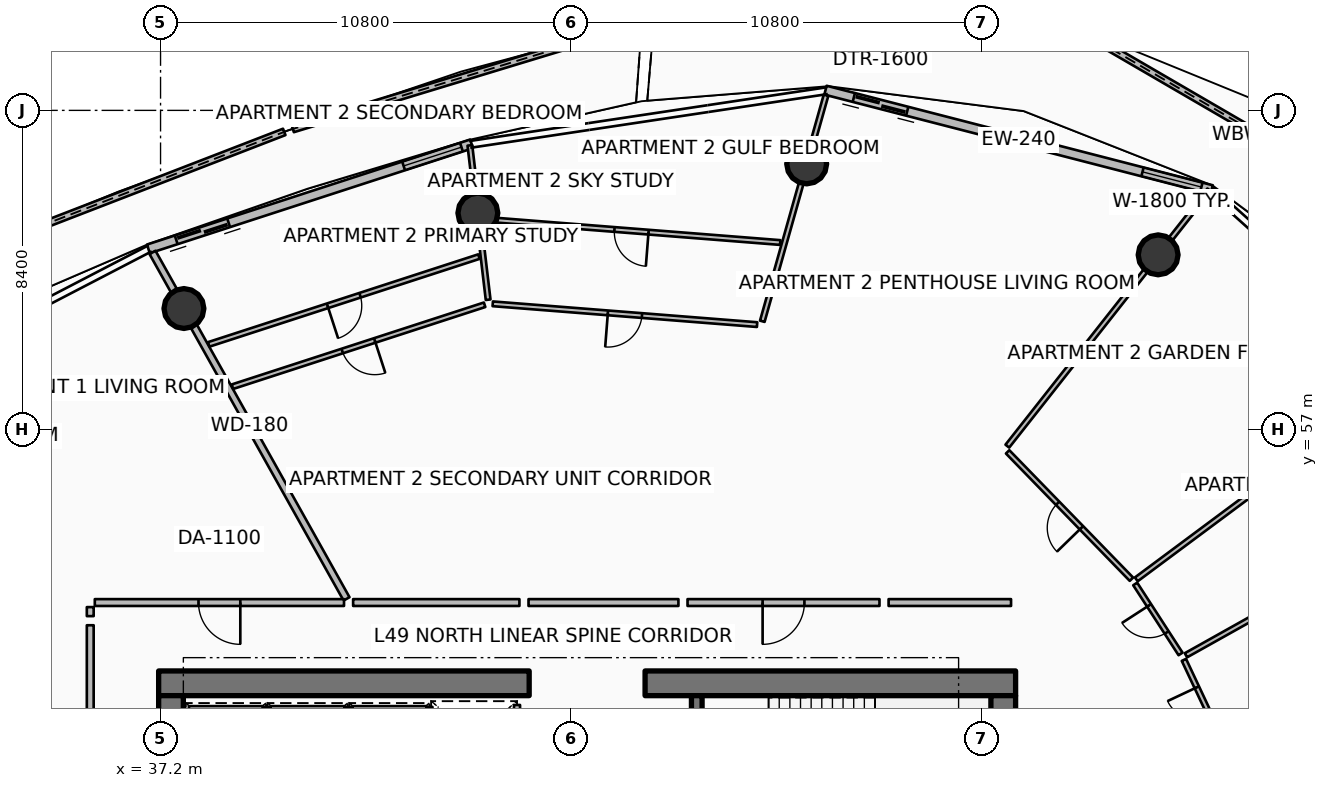
"""IFC4 building model, lengths in metres.
Left out: names, types, materials, properties, quantities, classifications, styles, units other than length and angle.
Written with IfcOpenShell. Run it as: python <this file> out.ifc"""

import sys

from ifc_helpers import new_model, si_unit, direction, frame, frame_2d, origin, origin_2d, place, context, subcontext, project, spatial, polyline, rectangle, circle, outline, extrude, element, fill, save


model = new_model("IFC4")
c1 = context("Model", 3, precision=1e-05, world=origin(), true_north=direction((0.0, 1.0)))
c2 = subcontext(c1, "Body", "Model", "MODEL_VIEW")
j1 = project(units=[si_unit("LENGTHUNIT", "METRE"), si_unit("PLANEANGLEUNIT", "RADIAN")], contexts=[c1])
p1 = place(None, origin())
s1 = spatial("IfcSite", under=j1, at=p1, CompositionType="ELEMENT")
p2 = place(p1, origin())
s2 = spatial("IfcBuilding", under=s1, at=p2, CompositionType="ELEMENT")
p3 = place(p2, frame((0.0, 0.0, 195.3)))
s3 = spatial("IfcBuildingStorey", under=s2, at=p3, CompositionType="ELEMENT", Elevation=195.3)
for number, where, z_axis, x_axis in (
    (1, (37.15, 50.325, 0.0), (0.0, 0.0, 1.0), (1.0, 0.0, 0.0)),
    (2, (49.95, 50.325, 0.0), (0.0, 0.0, 1.0), (1.0, 0.0, 0.0)),
):
    element("IfcWall", number, at=place(p3, frame(where, z_axis=z_axis, x_axis=x_axis)), inside=s3, PredefinedType="SHEAR", context=c2, shape_type="SweptSolid", body=[
        extrude(rectangle(XDim=9.75, YDim=0.65, at=frame_2d((4.875, 0.0))), origin(), (0.0, 0.0, 1.0), 3.75),
    ])
for number, where, z_axis, x_axis in (
    (3, (37.475, 34.0, 0.0), (0.0, 0.0, 1.0), (0.0, 1.0, 0.0)),
    (4, (59.375, 34.0, 0.0), (0.0, 0.0, 1.0), (0.0, 1.0, 0.0)),
):
    element("IfcWall", number, at=place(p3, frame(where, z_axis=z_axis, x_axis=x_axis)), inside=s3, PredefinedType="SHEAR", context=c2, shape_type="SweptSolid", body=[
        extrude(rectangle(XDim=16.0, YDim=0.65, at=frame_2d((8.0, 0.0))), origin(), (0.0, 0.0, 1.0), 3.75),
    ])
p4 = place(p3, frame((51.31, 46.5, 0.0), z_axis=(0.0, 0.0, 1.0), x_axis=(0.0, 1.0, 0.0)))
e5 = element("IfcWall", 5, at=p4, inside=s3, PredefinedType="SHEAR", context=c2, shape_type="SweptSolid", body=[
    extrude(rectangle(XDim=3.5, YDim=0.28, at=frame_2d((1.75, 0.0))), origin(), (0.0, 0.0, 1.0), 3.75),
])
for number, where, z_axis, x_axis in (
    (6, (63.451, 61.599, 0.0), (0.0, 0.0, 1.0), (1.0, 0.0, 0.0)),
    (7, (54.202, 63.992, 0.0), (0.0, 0.0, 1.0), (1.0, 0.0, 0.0)),
    (8, (45.55, 62.7, 0.0), (0.0, 0.0, 1.0), (1.0, 0.0, 0.0)),
    (9, (37.815, 60.186, 0.0), (0.0, 0.0, 1.0), (1.0, 0.0, 0.0)),
):
    element("IfcColumn", number, at=place(p3, frame(where, z_axis=z_axis, x_axis=x_axis)), inside=s3, PredefinedType="COLUMN", context=c2, shape_type="SweptSolid", body=[
        extrude(circle(Radius=0.525, at=origin_2d()), origin(), (0.0, 0.0, 1.0), 3.5),
    ])
p5 = place(p3, frame((71.016, 61.902, 0.0), z_axis=(0.0, 0.0, 1.0), x_axis=(-0.864391947404, 0.502818616663, 0.0)))
e10 = element("IfcWall", 10, at=p5, inside=s3, PredefinedType="PARAPET", context=c2, shape_type="SweptSolid", body=[
    extrude(outline(polyline([(0.0, 0.0), (11.37, 0.0), (11.37, 1.832), (5.685, 1.853), (0.0, 1.756), (0.0, 0.0)])), frame((0.0, 0.09, 0.0), z_axis=(0.0, -1.0, 0.0), x_axis=(1.0, 0.0, 0.0)), (0.0, 0.0, 1.0), 0.18),
])
p6 = place(p3, frame((49.865, 67.702, 0.0), z_axis=(0.0, 0.0, 1.0), x_axis=(-0.956822857871, -0.290671668135, 0.0)))
e11 = element("IfcWall", 11, at=p6, inside=s3, PredefinedType="PARAPET", context=c2, shape_type="SweptSolid", body=[
    extrude(outline(polyline([(0.0, 0.0), (9.598, 0.0), (9.598, 1.148), (4.799, 1.284), (0.0, 1.483), (0.0, 0.0)])), frame((0.0, 0.09, 0.0), z_axis=(0.0, -1.0, 0.0), x_axis=(1.0, 0.0, 0.0)), (0.0, 0.0, 1.0), 0.18),
])
p7 = place(p3, frame((40.455, 64.834, 0.0), z_axis=(0.0, 0.0, 1.0), x_axis=(-0.932733135956, -0.360567465378, 0.0)))
e12 = element("IfcWall", 12, at=p7, inside=s3, PredefinedType="PARAPET", context=c2, shape_type="SweptSolid", body=[
    extrude(outline(polyline([(0.0, 0.0), (9.473, 0.0), (9.473, 1.224), (4.736, 1.127), (0.0, 1.148), (0.0, 0.0)])), frame((0.0, 0.09, 0.0), z_axis=(0.0, -1.0, 0.0), x_axis=(1.0, 0.0, 0.0)), (0.0, 0.0, 1.0), 0.18),
])
p8 = place(p3, frame((64.86, 63.313, 0.0), z_axis=(0.0, 0.0, 1.0), x_axis=(-0.968374028006, 0.249502989727, 0.0)))
e13 = element("IfcWall", 13, at=p8, inside=s3, PredefinedType="SOLIDWALL", context=c2, shape_type="SweptSolid", body=[
    extrude(rectangle(XDim=10.494, YDim=0.24, at=frame_2d((5.247, 0.0))), origin(), (0.0, 0.0, 1.0), 2.45),
])
p9 = place(p8, frame((8.274, 0.0, 0.0)))
e14 = element("IfcOpeningElement", 14, at=p9, cuts=e13, PredefinedType="OPENING", context=c2, shape_type="SweptSolid", body=[
    extrude(rectangle(XDim=1.45, YDim=2.15, at=frame_2d((0.725, 1.075))), frame((0.0, 0.13, 0.0), z_axis=(0.0, -1.0, 0.0), x_axis=(1.0, 0.0, 0.0)), (0.0, 0.0, 1.0), 0.26),
])
p10 = place(p8, frame((0.28, 0.0, 0.65)))
e15 = element("IfcOpeningElement", 15, at=p10, cuts=e13, PredefinedType="OPENING", context=c2, shape_type="SweptSolid", body=[
    extrude(rectangle(XDim=1.6, YDim=1.5, at=frame_2d((0.8, 0.75))), frame((0.0, 0.13, 0.0), z_axis=(0.0, -1.0, 0.0), x_axis=(1.0, 0.0, 0.0)), (0.0, 0.0, 1.0), 0.26),
])
p11 = place(p3, frame((45.384, 64.519, 0.0), z_axis=(0.0, 0.0, 1.0), x_axis=(-0.951058543936, -0.309010753869, 0.0)))
e16 = element("IfcWall", 16, at=p11, inside=s3, PredefinedType="SOLIDWALL", context=c2, shape_type="SweptSolid", body=[
    extrude(rectangle(XDim=8.942, YDim=0.24, at=frame_2d((4.471, 0.0))), origin(), (0.0, 0.0, 1.0), 2.45),
])
p12 = place(p11, frame((6.722, 0.0, 0.0)))
e17 = element("IfcOpeningElement", 17, at=p12, cuts=e16, PredefinedType="OPENING", context=c2, shape_type="SweptSolid", body=[
    extrude(rectangle(XDim=1.45, YDim=2.15, at=frame_2d((0.725, 1.075))), frame((0.0, 0.13, 0.0), z_axis=(0.0, -1.0, 0.0), x_axis=(1.0, 0.0, 0.0)), (0.0, 0.0, 1.0), 0.26),
])
p13 = place(p11, frame((0.28, 0.0, 0.65)))
e18 = element("IfcOpeningElement", 18, at=p13, cuts=e16, PredefinedType="OPENING", context=c2, shape_type="SweptSolid", body=[
    extrude(rectangle(XDim=1.6, YDim=1.5, at=frame_2d((0.8, 0.75))), frame((0.0, 0.13, 0.0), z_axis=(0.0, -1.0, 0.0), x_axis=(1.0, 0.0, 0.0)), (0.0, 0.0, 1.0), 0.26),
])
for number, where, z_axis, x_axis in (
    (19, (39.975, 48.095, 0.0), (0.0, 0.0, 1.0), (0.0, 1.0, 0.0)),
    (20, (42.125, 48.095, 0.0), (0.0, 0.0, 1.0), (0.0, 1.0, 0.0)),
    (21, (44.275, 48.095, 0.0), (0.0, 0.0, 1.0), (0.0, 1.0, 0.0)),
):
    element("IfcWall", number, at=place(p3, frame(where, z_axis=z_axis, x_axis=x_axis)), inside=s3, PredefinedType="PARTITIONING", context=c2, shape_type="SweptSolid", body=[
        extrude(rectangle(XDim=1.61, YDim=0.16, at=frame_2d((0.805, 0.0))), origin(), (0.0, 0.0, 1.0), 3.5),
    ])
p14 = place(p3, frame((46.58, 48.045, 0.0), z_axis=(0.0, 0.0, 1.0), x_axis=(0.0, 1.0, 0.0)))
e22 = element("IfcWall", 22, at=p14, inside=s3, PredefinedType="PARTITIONING", context=c2, shape_type="SweptSolid", body=[
    extrude(rectangle(XDim=1.71, YDim=0.16, at=frame_2d((0.855, 0.0))), origin(), (0.0, 0.0, 1.0), 3.5),
])
p15 = place(p3, frame((42.094, 52.546, 0.0), z_axis=(0.0, 0.0, 1.0), x_axis=(-0.488614041717, 0.872500039104, 0.0)))
e23 = element("IfcWall", 23, at=p15, inside=s3, PredefinedType="PARTITIONING", context=c2, shape_type="SweptSolid", body=[
    extrude(rectangle(XDim=10.448, YDim=0.18, at=frame_2d((5.224, 0.0))), origin(), (0.0, 0.0, 1.0), 2.94),
])
p16 = place(p3, frame((42.028, 52.45, 0.0), z_axis=(0.0, 0.0, 1.0), x_axis=(-1.0, 0.0, 0.0)))
e24 = element("IfcWall", 24, at=p16, inside=s3, PredefinedType="PARTITIONING", context=c2, shape_type="SweptSolid", body=[
    extrude(rectangle(XDim=6.558, YDim=0.18, at=frame_2d((3.279, 0.0))), origin(), (0.0, 0.0, 1.0), 2.94),
])
p17 = place(p16, frame((2.729, 0.0, 0.0)))
e25 = element("IfcOpeningElement", 25, at=p17, cuts=e24, PredefinedType="OPENING", context=c2, shape_type="SweptSolid", body=[
    extrude(rectangle(XDim=1.1, YDim=2.1, at=frame_2d((0.55, 1.05))), frame((0.0, 0.1, 0.0), z_axis=(0.0, -1.0, 0.0), x_axis=(1.0, 0.0, 0.0)), (0.0, 0.0, 1.0), 0.2),
])
p18 = place(p3, frame((35.35, 52.33, 0.0), z_axis=(0.0, 0.0, 1.0), x_axis=(0.0, -1.0, 0.0)))
e26 = element("IfcWall", 26, at=p18, inside=s3, PredefinedType="PARTITIONING", context=c2, shape_type="SweptSolid", body=[
    extrude(rectangle(XDim=0.238, YDim=0.18, at=frame_2d((0.119, 0.0))), origin(), (0.0, 0.0, 1.0), 2.94),
])
p19 = place(p3, frame((35.35, 51.853, 0.0), z_axis=(0.0, 0.0, 1.0), x_axis=(0.0, -1.0, 0.0)))
e27 = element("IfcWall", 27, at=p19, inside=s3, PredefinedType="PARTITIONING", context=c2, shape_type="SweptSolid", body=[
    extrude(rectangle(XDim=6.165, YDim=0.18, at=frame_2d((3.083, 0.0))), origin(), (0.0, 0.0, 1.0), 2.94),
])
p20 = place(p3, frame((56.118, 52.45, 0.0), z_axis=(0.0, 0.0, 1.0), x_axis=(-1.0, 0.0, 0.0)))
e28 = element("IfcWall", 28, at=p20, inside=s3, PredefinedType="PARTITIONING", context=c2, shape_type="SweptSolid", body=[
    extrude(rectangle(XDim=5.051, YDim=0.18, at=frame_2d((2.525, 0.0))), origin(), (0.0, 0.0, 1.0), 2.94),
])
p21 = place(p20, frame((1.975, 0.0, 0.0)))
e29 = element("IfcOpeningElement", 29, at=p21, cuts=e28, PredefinedType="OPENING", context=c2, shape_type="SweptSolid", body=[
    extrude(rectangle(XDim=1.1, YDim=2.1, at=frame_2d((0.55, 1.05))), frame((0.0, 0.1, 0.0), z_axis=(0.0, -1.0, 0.0), x_axis=(1.0, 0.0, 0.0)), (0.0, 0.0, 1.0), 0.2),
])
p22 = place(p3, frame((65.288, 48.688, 0.0), z_axis=(0.0, 0.0, 1.0), x_axis=(0.932645255022, 0.360794717652, 0.0)))
e30 = element("IfcWall", 30, at=p22, inside=s3, PredefinedType="PARTITIONING", context=c2, shape_type="SweptSolid", body=[
    extrude(rectangle(XDim=8.863, YDim=0.125, at=frame_2d((4.432, 0.0))), origin(), (0.0, 0.0, 1.0), 2.94),
])
p23 = place(p3, frame((65.17, 48.728, 0.0), z_axis=(0.0, 0.0, 1.0), x_axis=(-0.42584510915, 0.904796078138, 0.0)))
e31 = element("IfcWall", 31, at=p23, inside=s3, PredefinedType="PARTITIONING", context=c2, shape_type="SweptSolid", body=[
    extrude(rectangle(XDim=2.446, YDim=0.125, at=frame_2d((1.223, 0.0))), origin(), (0.0, 0.0, 1.0), 2.94),
])
p24 = place(p23, frame((0.798, 0.0, 0.0)))
e32 = element("IfcOpeningElement", 32, at=p24, cuts=e31, PredefinedType="OPENING", context=c2, shape_type="SweptSolid", body=[
    extrude(rectangle(XDim=0.85, YDim=2.06, at=frame_2d((0.425, 1.03))), frame((0.0, 0.073, 0.0), z_axis=(0.0, -1.0, 0.0), x_axis=(1.0, 0.0, 0.0)), (0.0, 0.0, 1.0), 0.145),
])
p25 = place(p3, frame((59.58, 52.45, 0.0), z_axis=(0.0, 0.0, 1.0), x_axis=(-1.0, 0.0, 0.0)))
e33 = element("IfcWall", 33, at=p25, inside=s3, PredefinedType="PARTITIONING", context=c2, shape_type="SweptSolid", body=[
    extrude(rectangle(XDim=3.222, YDim=0.18, at=frame_2d((1.611, 0.0))), origin(), (0.0, 0.0, 1.0), 2.94),
])
p26 = place(p3, frame((64.182, 51.062, 0.0), z_axis=(0.0, 0.0, 1.0), x_axis=(0.872500226359, 0.488613707344, 0.0)))
e34 = element("IfcWall", 34, at=p26, inside=s3, PredefinedType="PARTITIONING", context=c2, shape_type="SweptSolid", body=[
    extrude(rectangle(XDim=9.348, YDim=0.125, at=frame_2d((4.674, 0.0))), origin(), (0.0, 0.0, 1.0), 2.94),
])
p27 = place(p3, frame((59.482, 56.565, 0.0), z_axis=(0.0, 0.0, 1.0), x_axis=(0.619076951814, 0.785330330328, 0.0)))
e35 = element("IfcWall", 35, at=p27, inside=s3, PredefinedType="PARTITIONING", context=c2, shape_type="SweptSolid", body=[
    extrude(rectangle(XDim=8.583, YDim=0.125, at=frame_2d((4.292, 0.0))), origin(), (0.0, 0.0, 1.0), 2.94),
])
p28 = place(p3, frame((62.876, 53.06, 0.0), z_axis=(0.0, 0.0, 1.0), x_axis=(0.802513116708, 0.596634475631, 0.0)))
e36 = element("IfcWall", 36, at=p28, inside=s3, PredefinedType="PARTITIONING", context=c2, shape_type="SweptSolid", body=[
    extrude(rectangle(XDim=9.091, YDim=0.125, at=frame_2d((4.545, 0.0))), origin(), (0.0, 0.0, 1.0), 2.94),
])
p29 = place(p3, frame((64.041, 51.097, 0.0), z_axis=(0.0, 0.0, 1.0), x_axis=(-0.543689429225, 0.839286485384, 0.0)))
e37 = element("IfcWall", 37, at=p29, inside=s3, PredefinedType="PARTITIONING", context=c2, shape_type="SweptSolid", body=[
    extrude(rectangle(XDim=2.195, YDim=0.125, at=frame_2d((1.097, 0.0))), origin(), (0.0, 0.0, 1.0), 2.94),
])
p30 = place(p29, frame((0.672, 0.0, 0.0)))
e38 = element("IfcOpeningElement", 38, at=p30, cuts=e37, PredefinedType="OPENING", context=c2, shape_type="SweptSolid", body=[
    extrude(rectangle(XDim=0.85, YDim=2.06, at=frame_2d((0.425, 1.03))), frame((0.0, 0.073, 0.0), z_axis=(0.0, -1.0, 0.0), x_axis=(1.0, 0.0, 0.0)), (0.0, 0.0, 1.0), 0.145),
])
p31 = place(p3, frame((62.748, 53.064, 0.0), z_axis=(0.0, 0.0, 1.0), x_axis=(-0.697059745536, 0.717013048106, 0.0)))
e39 = element("IfcWall", 39, at=p31, inside=s3, PredefinedType="PARTITIONING", context=c2, shape_type="SweptSolid", body=[
    extrude(rectangle(XDim=4.674, YDim=0.125, at=frame_2d((2.337, 0.0))), origin(), (0.0, 0.0, 1.0), 2.94),
])
p32 = place(p31, frame((1.887, 0.0, 0.0)))
e40 = element("IfcOpeningElement", 40, at=p32, cuts=e39, PredefinedType="OPENING", context=c2, shape_type="SweptSolid", body=[
    extrude(rectangle(XDim=0.9, YDim=2.08, at=frame_2d((0.45, 1.04))), frame((0.0, 0.073, 0.0), z_axis=(0.0, -1.0, 0.0), x_axis=(1.0, 0.0, 0.0)), (0.0, 0.0, 1.0), 0.145),
])
p33 = place(p3, frame((50.827, 52.45, 0.0), z_axis=(0.0, 0.0, 1.0), x_axis=(-1.0, 0.0, 0.0)))
e41 = element("IfcWall", 41, at=p33, inside=s3, PredefinedType="PARTITIONING", context=c2, shape_type="SweptSolid", body=[
    extrude(rectangle(XDim=3.944, YDim=0.18, at=frame_2d((1.972, 0.0))), origin(), (0.0, 0.0, 1.0), 2.94),
])
p34 = place(p3, frame((53.034, 59.851, 0.0), z_axis=(0.0, 0.0, 1.0), x_axis=(0.271437645754, 0.96245602729, 0.0)))
e42 = element("IfcWall", 42, at=p34, inside=s3, PredefinedType="PARTITIONING", context=c2, shape_type="SweptSolid", body=[
    extrude(rectangle(XDim=6.18, YDim=0.125, at=frame_2d((3.09, 0.0))), origin(), (0.0, 0.0, 1.0), 2.94),
])
p35 = place(p3, frame((52.898, 59.763, 0.0), z_axis=(0.0, 0.0, 1.0), x_axis=(-0.996915822173, 0.078478299552, 0.0)))
e43 = element("IfcWall", 43, at=p35, inside=s3, PredefinedType="PARTITIONING", context=c2, shape_type="SweptSolid", body=[
    extrude(rectangle(XDim=6.978, YDim=0.125, at=frame_2d((3.489, 0.0))), origin(), (0.0, 0.0, 1.0), 2.94),
])
p36 = place(p35, frame((3.039, 0.0, 0.0)))
e44 = element("IfcOpeningElement", 44, at=p36, cuts=e43, PredefinedType="OPENING", context=c2, shape_type="SweptSolid", body=[
    extrude(rectangle(XDim=0.9, YDim=2.08, at=frame_2d((0.45, 1.04))), frame((0.0, 0.073, 0.0), z_axis=(0.0, -1.0, 0.0), x_axis=(1.0, 0.0, 0.0)), (0.0, 0.0, 1.0), 0.145),
])
p37 = place(p3, frame((53.507, 61.923, 0.0), z_axis=(0.0, 0.0, 1.0), x_axis=(-0.996916671393, 0.078467511105, 0.0)))
e45 = element("IfcWall", 45, at=p37, inside=s3, PredefinedType="PARTITIONING", context=c2, shape_type="SweptSolid", body=[
    extrude(rectangle(XDim=7.853, YDim=0.125, at=frame_2d((3.927, 0.0))), origin(), (0.0, 0.0, 1.0), 2.94),
])
p38 = place(p37, frame((3.477, 0.0, 0.0)))
e46 = element("IfcOpeningElement", 46, at=p38, cuts=e45, PredefinedType="OPENING", context=c2, shape_type="SweptSolid", body=[
    extrude(rectangle(XDim=0.9, YDim=2.08, at=frame_2d((0.45, 1.04))), frame((0.0, 0.073, 0.0), z_axis=(0.0, -1.0, 0.0), x_axis=(1.0, 0.0, 0.0)), (0.0, 0.0, 1.0), 0.145),
])
p39 = place(p3, frame((46.643, 52.45, 0.0), z_axis=(0.0, 0.0, 1.0), x_axis=(-1.0, 0.0, 0.0)))
e47 = element("IfcWall", 47, at=p39, inside=s3, PredefinedType="PARTITIONING", context=c2, shape_type="SweptSolid", body=[
    extrude(rectangle(XDim=4.376, YDim=0.18, at=frame_2d((2.188, 0.0))), origin(), (0.0, 0.0, 1.0), 2.94),
])
p40 = place(p3, frame((45.82, 60.418, 0.0), z_axis=(0.0, 0.0, 1.0), x_axis=(-0.117520306907, 0.993070479606, 0.0)))
e48 = element("IfcWall", 48, at=p40, inside=s3, PredefinedType="PARTITIONING", context=c2, shape_type="SweptSolid", body=[
    extrude(rectangle(XDim=4.088, YDim=0.125, at=frame_2d((2.044, 0.0))), origin(), (0.0, 0.0, 1.0), 2.94),
])
p41 = place(p3, frame((45.727, 60.285, 0.0), z_axis=(0.0, 0.0, 1.0), x_axis=(-0.951056178842, -0.309018032946, 0.0)))
e49 = element("IfcWall", 49, at=p41, inside=s3, PredefinedType="PARTITIONING", context=c2, shape_type="SweptSolid", body=[
    extrude(rectangle(XDim=6.978, YDim=0.125, at=frame_2d((3.489, 0.0))), origin(), (0.0, 0.0, 1.0), 2.94),
])
p42 = place(p41, frame((3.039, 0.0, 0.0)))
e50 = element("IfcOpeningElement", 50, at=p42, cuts=e49, PredefinedType="OPENING", context=c2, shape_type="SweptSolid", body=[
    extrude(rectangle(XDim=0.9, YDim=2.08, at=frame_2d((0.45, 1.04))), frame((0.0, 0.073, 0.0), z_axis=(0.0, -1.0, 0.0), x_axis=(1.0, 0.0, 0.0)), (0.0, 0.0, 1.0), 0.145),
])
p43 = place(p3, frame((45.577, 61.552, 0.0), z_axis=(0.0, 0.0, 1.0), x_axis=(-0.95105638647, -0.309017393935, 0.0)))
e51 = element("IfcWall", 51, at=p43, inside=s3, PredefinedType="PARTITIONING", context=c2, shape_type="SweptSolid", body=[
    extrude(rectangle(XDim=7.476, YDim=0.125, at=frame_2d((3.738, 0.0))), origin(), (0.0, 0.0, 1.0), 2.94),
])
p44 = place(p43, frame((3.288, 0.0, 0.0)))
e52 = element("IfcOpeningElement", 52, at=p44, cuts=e51, PredefinedType="OPENING", context=c2, shape_type="SweptSolid", body=[
    extrude(rectangle(XDim=0.9, YDim=2.08, at=frame_2d((0.45, 1.04))), frame((0.0, 0.073, 0.0), z_axis=(0.0, -1.0, 0.0), x_axis=(1.0, 0.0, 0.0)), (0.0, 0.0, 1.0), 0.145),
])
p45 = place(p9, origin())
e53 = element("IfcDoor", 53, at=p45, inside=s3, OperationType="DOUBLE_DOOR_SLIDING", PredefinedType="DOOR", context=c2, shape_type="SweptSolid", body=[
    extrude(rectangle(XDim=1.45, YDim=2.15, at=frame_2d((0.725, 1.075))), frame((0.0, 0.025, 0.0), z_axis=(0.0, -1.0, 0.0), x_axis=(1.0, 0.0, 0.0)), (0.0, 0.0, 1.0), 0.05),
])
fill(e14, e53)
p46 = place(p10, origin())
e54 = element("IfcWindow", 54, at=p46, inside=s3, PartitioningType="SINGLE_PANEL", PredefinedType="WINDOW", context=c2, shape_type="SweptSolid", body=[
    extrude(rectangle(XDim=1.6, YDim=1.5, at=frame_2d((0.8, 0.75))), frame((0.0, 0.03, 0.0), z_axis=(0.0, -1.0, 0.0), x_axis=(1.0, 0.0, 0.0)), (0.0, 0.0, 1.0), 0.06),
])
fill(e15, e54)
p47 = place(p12, origin())
e55 = element("IfcDoor", 55, at=p47, inside=s3, OperationType="DOUBLE_DOOR_SLIDING", PredefinedType="DOOR", context=c2, shape_type="SweptSolid", body=[
    extrude(rectangle(XDim=1.45, YDim=2.15, at=frame_2d((0.725, 1.075))), frame((0.0, 0.025, 0.0), z_axis=(0.0, -1.0, 0.0), x_axis=(1.0, 0.0, 0.0)), (0.0, 0.0, 1.0), 0.05),
])
fill(e17, e55)
p48 = place(p13, origin())
e56 = element("IfcWindow", 56, at=p48, inside=s3, PartitioningType="SINGLE_PANEL", PredefinedType="WINDOW", context=c2, shape_type="SweptSolid", body=[
    extrude(rectangle(XDim=1.6, YDim=1.5, at=frame_2d((0.8, 0.75))), frame((0.0, 0.03, 0.0), z_axis=(0.0, -1.0, 0.0), x_axis=(1.0, 0.0, 0.0)), (0.0, 0.0, 1.0), 0.06),
])
fill(e18, e56)
p49 = place(p17, origin())
e57 = element("IfcDoor", 57, at=p49, inside=s3, OperationType="SINGLE_SWING_LEFT", PredefinedType="DOOR", context=c2, shape_type="SweptSolid", body=[
    extrude(rectangle(XDim=1.1, YDim=2.1, at=frame_2d((0.55, 1.05))), frame((0.0, 0.025, 0.0), z_axis=(0.0, -1.0, 0.0), x_axis=(1.0, 0.0, 0.0)), (0.0, 0.0, 1.0), 0.05),
])
fill(e25, e57)
p50 = place(p21, origin())
e58 = element("IfcDoor", 58, at=p50, inside=s3, OperationType="SINGLE_SWING_RIGHT", PredefinedType="DOOR", context=c2, shape_type="SweptSolid", body=[
    extrude(rectangle(XDim=1.1, YDim=2.1, at=frame_2d((0.55, 1.05))), frame((0.0, 0.025, 0.0), z_axis=(0.0, -1.0, 0.0), x_axis=(1.0, 0.0, 0.0)), (0.0, 0.0, 1.0), 0.05),
])
fill(e29, e58)
p51 = place(p24, origin())
e59 = element("IfcDoor", 59, at=p51, inside=s3, OperationType="SINGLE_SWING_RIGHT", PredefinedType="DOOR", context=c2, shape_type="SweptSolid", body=[
    extrude(rectangle(XDim=0.85, YDim=2.06, at=frame_2d((0.425, 1.03))), frame((0.0, 0.025, 0.0), z_axis=(0.0, -1.0, 0.0), x_axis=(1.0, 0.0, 0.0)), (0.0, 0.0, 1.0), 0.05),
])
fill(e32, e59)
p52 = place(p30, origin())
e60 = element("IfcDoor", 60, at=p52, inside=s3, OperationType="SINGLE_SWING_RIGHT", PredefinedType="DOOR", context=c2, shape_type="SweptSolid", body=[
    extrude(rectangle(XDim=0.85, YDim=2.06, at=frame_2d((0.425, 1.03))), frame((0.0, 0.025, 0.0), z_axis=(0.0, -1.0, 0.0), x_axis=(1.0, 0.0, 0.0)), (0.0, 0.0, 1.0), 0.05),
])
fill(e38, e60)
p53 = place(p32, origin())
e61 = element("IfcDoor", 61, at=p53, inside=s3, OperationType="SINGLE_SWING_LEFT", PredefinedType="DOOR", context=c2, shape_type="SweptSolid", body=[
    extrude(rectangle(XDim=0.9, YDim=2.08, at=frame_2d((0.45, 1.04))), frame((0.0, 0.025, 0.0), z_axis=(0.0, -1.0, 0.0), x_axis=(1.0, 0.0, 0.0)), (0.0, 0.0, 1.0), 0.05),
])
fill(e40, e61)
p54 = place(p36, origin())
e62 = element("IfcDoor", 62, at=p54, inside=s3, OperationType="SINGLE_SWING_RIGHT", PredefinedType="DOOR", context=c2, shape_type="SweptSolid", body=[
    extrude(rectangle(XDim=0.9, YDim=2.08, at=frame_2d((0.45, 1.04))), frame((0.0, 0.025, 0.0), z_axis=(0.0, -1.0, 0.0), x_axis=(1.0, 0.0, 0.0)), (0.0, 0.0, 1.0), 0.05),
])
fill(e44, e62)
p55 = place(p38, origin())
e63 = element("IfcDoor", 63, at=p55, inside=s3, OperationType="SINGLE_SWING_LEFT", PredefinedType="DOOR", context=c2, shape_type="SweptSolid", body=[
    extrude(rectangle(XDim=0.9, YDim=2.08, at=frame_2d((0.45, 1.04))), frame((0.0, 0.025, 0.0), z_axis=(0.0, -1.0, 0.0), x_axis=(1.0, 0.0, 0.0)), (0.0, 0.0, 1.0), 0.05),
])
fill(e46, e63)
p56 = place(p42, origin())
e64 = element("IfcDoor", 64, at=p56, inside=s3, OperationType="SINGLE_SWING_LEFT", PredefinedType="DOOR", context=c2, shape_type="SweptSolid", body=[
    extrude(rectangle(XDim=0.9, YDim=2.08, at=frame_2d((0.45, 1.04))), frame((0.0, 0.025, 0.0), z_axis=(0.0, -1.0, 0.0), x_axis=(1.0, 0.0, 0.0)), (0.0, 0.0, 1.0), 0.05),
])
fill(e50, e64)
p57 = place(p44, origin())
e65 = element("IfcDoor", 65, at=p57, inside=s3, OperationType="SINGLE_SWING_RIGHT", PredefinedType="DOOR", context=c2, shape_type="SweptSolid", body=[
    extrude(rectangle(XDim=0.9, YDim=2.08, at=frame_2d((0.45, 1.04))), frame((0.0, 0.025, 0.0), z_axis=(0.0, -1.0, 0.0), x_axis=(1.0, 0.0, 0.0)), (0.0, 0.0, 1.0), 0.05),
])
fill(e52, e65)
save(model, sys.argv[1])
